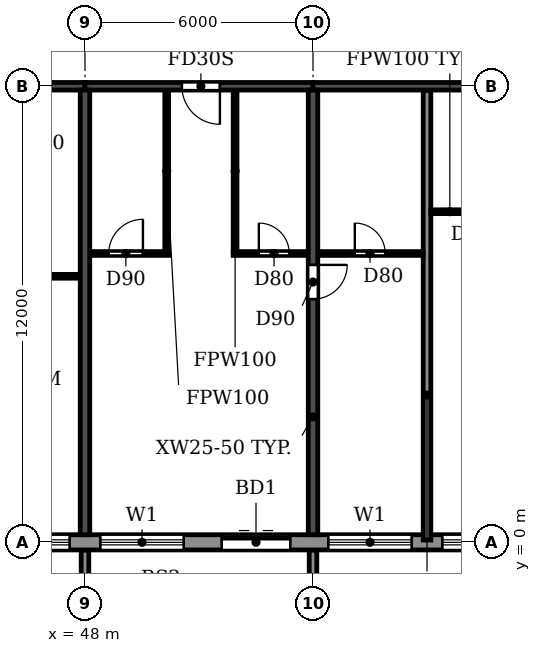
"""IFC4 building model, lengths in metres.
Left out: names, types, materials, properties, quantities, classifications, styles, units other than length and angle.
Written with IfcOpenShell. Run it as: python <this file> out.ifc"""

import sys

from ifc_helpers import new_model, si_unit, direction, frame, frame_2d, origin, place, context, subcontext, project, spatial, polyline, rectangle, outline, extrude, source, transform, mapped, element, fill, save


model = new_model("IFC4")
c1 = context("Model", 3, precision=1e-05, world=origin(), true_north=direction((0.0, 1.0)))
c2 = subcontext(c1, "Body", "Model", "MODEL_VIEW")
j1 = project(units=[si_unit("LENGTHUNIT", "METRE"), si_unit("PLANEANGLEUNIT", "RADIAN")], contexts=[c1])
p1 = place(None, origin())
s1 = spatial("IfcSite", under=j1, at=p1, CompositionType="ELEMENT")
p2 = place(p1, origin())
s2 = spatial("IfcBuilding", under=s1, at=p2, CompositionType="ELEMENT")
p3 = place(p2, frame((0.0, 0.0, 257.7)))
s3 = spatial("IfcBuildingStorey", under=s2, at=p3, CompositionType="ELEMENT", Elevation=257.7)
p4 = place(p3, frame((48.0, 0.2, 0.0), z_axis=(0.0, 0.0, 1.0), x_axis=(0.0, 1.0, 0.0)))
e1 = element("IfcWall", 1, at=p4, inside=s3, PredefinedType="SHEAR", context=c2, shape_type="SweptSolid", body=[
    extrude(rectangle(XDim=11.7, YDim=0.25, at=frame_2d((5.85, 0.0))), origin(), (0.0, 0.0, 1.0), 3.0),
])
p5 = place(p3, frame((54.0, 0.2, 0.0), z_axis=(0.0, 0.0, 1.0), x_axis=(0.0, 1.0, 0.0)))
e2 = element("IfcWall", 2, at=p5, inside=s3, PredefinedType="SHEAR", context=c2, shape_type="SweptSolid", body=[
    extrude(rectangle(XDim=11.7, YDim=0.25, at=frame_2d((5.85, 0.0))), origin(), (0.0, 0.0, 1.0), 3.0),
])
p6 = place(p5, frame((6.2, 0.0, 0.0)))
e3 = element("IfcOpeningElement", 3, at=p6, cuts=e2, PredefinedType="OPENING", context=c2, shape_type="SweptSolid", body=[
    extrude(rectangle(XDim=0.9, YDim=2.1, at=frame_2d((0.45, 1.05))), frame((0.0, 0.135, 0.0), z_axis=(0.0, -1.0, 0.0), x_axis=(1.0, 0.0, 0.0)), (0.0, 0.0, 1.0), 0.27),
])
p7 = place(p3, frame((42.0, 12.0, 0.0), z_axis=(0.0, 0.0, 1.0), x_axis=(1.0, 0.0, 0.0)))
e4 = element("IfcWall", 4, at=p7, inside=s3, PredefinedType="SHEAR", context=c2, shape_type="SweptSolid", body=[
    extrude(rectangle(XDim=6.0, YDim=0.2, at=frame_2d((3.0, 0.0))), origin(), (0.0, 0.0, 1.0), 2.4),
])
p8 = place(p7, frame((2.55, 0.0, 0.0)))
e5 = element("IfcOpeningElement", 5, at=p8, cuts=e4, PredefinedType="OPENING", context=c2, shape_type="SweptSolid", body=[
    extrude(rectangle(XDim=1.0, YDim=2.1, at=frame_2d((0.5, 1.05))), frame((0.0, 0.11, 0.0), z_axis=(0.0, -1.0, 0.0), x_axis=(1.0, 0.0, 0.0)), (0.0, 0.0, 1.0), 0.22),
])
p9 = place(p3, frame((48.0, 12.0, 0.0), z_axis=(0.0, 0.0, 1.0), x_axis=(1.0, 0.0, 0.0)))
e6 = element("IfcWall", 6, at=p9, inside=s3, PredefinedType="SHEAR", context=c2, shape_type="SweptSolid", body=[
    extrude(rectangle(XDim=6.0, YDim=0.2, at=frame_2d((3.0, 0.0))), origin(), (0.0, 0.0, 1.0), 2.4),
])
p10 = place(p9, frame((2.55, 0.0, 0.0)))
e7 = element("IfcOpeningElement", 7, at=p10, cuts=e6, PredefinedType="OPENING", context=c2, shape_type="SweptSolid", body=[
    extrude(rectangle(XDim=1.0, YDim=2.1, at=frame_2d((0.5, 1.05))), frame((0.0, 0.11, 0.0), z_axis=(0.0, -1.0, 0.0), x_axis=(1.0, 0.0, 0.0)), (0.0, 0.0, 1.0), 0.22),
])
p11 = place(p3, frame((54.0, 12.0, 0.0), z_axis=(0.0, 0.0, 1.0), x_axis=(1.0, 0.0, 0.0)))
e8 = element("IfcWall", 8, at=p11, inside=s3, PredefinedType="SHEAR", context=c2, shape_type="SweptSolid", body=[
    extrude(rectangle(XDim=6.0, YDim=0.2, at=frame_2d((3.0, 0.0))), origin(), (0.0, 0.0, 1.0), 2.4),
])
p12 = place(p3, frame((22.683, 0.0, 0.0), z_axis=(0.0, 0.0, 1.0), x_axis=(1.0, 0.0, 0.0)))
e9 = element("IfcWall", 9, at=p12, inside=s3, PredefinedType="STANDARD", context=c2, shape_type="SweptSolid", body=[
    extrude(rectangle(XDim=56.634, YDim=0.4, at=frame_2d((28.317, 0.0))), origin(), (0.0, 0.0, 1.0), 3.0),
])
p13 = place(p12, frame((1.717, 0.0, 0.9)))
e10 = element("IfcOpeningElement", 10, at=p13, cuts=e9, PredefinedType="OPENING", context=c2, shape_type="SweptSolid", body=[
    extrude(rectangle(XDim=2.2, YDim=1.5, at=frame_2d((1.1, 0.75))), frame((0.0, 0.21, 0.0), z_axis=(0.0, -1.0, 0.0), x_axis=(1.0, 0.0, 0.0)), (0.0, 0.0, 1.0), 0.42),
])
p14 = place(p12, frame((4.917, 0.0, 0.0)))
e11 = element("IfcOpeningElement", 11, at=p14, cuts=e9, PredefinedType="OPENING", context=c2, shape_type="SweptSolid", body=[
    extrude(rectangle(XDim=1.8, YDim=2.4, at=frame_2d((0.9, 1.2))), frame((0.0, 0.21, 0.0), z_axis=(0.0, -1.0, 0.0), x_axis=(1.0, 0.0, 0.0)), (0.0, 0.0, 1.0), 0.42),
])
p15 = place(p12, frame((7.717, 0.0, 0.9)))
e12 = element("IfcOpeningElement", 12, at=p15, cuts=e9, PredefinedType="OPENING", context=c2, shape_type="SweptSolid", body=[
    extrude(rectangle(XDim=2.2, YDim=1.5, at=frame_2d((1.1, 0.75))), frame((0.0, 0.21, 0.0), z_axis=(0.0, -1.0, 0.0), x_axis=(1.0, 0.0, 0.0)), (0.0, 0.0, 1.0), 0.42),
])
p16 = place(p12, frame((10.717, 0.0, 0.9)))
e13 = element("IfcOpeningElement", 13, at=p16, cuts=e9, PredefinedType="OPENING", context=c2, shape_type="SweptSolid", body=[
    extrude(rectangle(XDim=2.2, YDim=1.5, at=frame_2d((1.1, 0.75))), frame((0.0, 0.21, 0.0), z_axis=(0.0, -1.0, 0.0), x_axis=(1.0, 0.0, 0.0)), (0.0, 0.0, 1.0), 0.42),
])
p17 = place(p12, frame((13.717, 0.0, 0.9)))
e14 = element("IfcOpeningElement", 14, at=p17, cuts=e9, PredefinedType="OPENING", context=c2, shape_type="SweptSolid", body=[
    extrude(rectangle(XDim=2.2, YDim=1.5, at=frame_2d((1.1, 0.75))), frame((0.0, 0.21, 0.0), z_axis=(0.0, -1.0, 0.0), x_axis=(1.0, 0.0, 0.0)), (0.0, 0.0, 1.0), 0.42),
])
p18 = place(p12, frame((16.917, 0.0, 0.0)))
e15 = element("IfcOpeningElement", 15, at=p18, cuts=e9, PredefinedType="OPENING", context=c2, shape_type="SweptSolid", body=[
    extrude(rectangle(XDim=1.8, YDim=2.4, at=frame_2d((0.9, 1.2))), frame((0.0, 0.21, 0.0), z_axis=(0.0, -1.0, 0.0), x_axis=(1.0, 0.0, 0.0)), (0.0, 0.0, 1.0), 0.42),
])
p19 = place(p12, frame((19.717, 0.0, 0.9)))
e16 = element("IfcOpeningElement", 16, at=p19, cuts=e9, PredefinedType="OPENING", context=c2, shape_type="SweptSolid", body=[
    extrude(rectangle(XDim=2.2, YDim=1.5, at=frame_2d((1.1, 0.75))), frame((0.0, 0.21, 0.0), z_axis=(0.0, -1.0, 0.0), x_axis=(1.0, 0.0, 0.0)), (0.0, 0.0, 1.0), 0.42),
])
p20 = place(p12, frame((22.717, 0.0, 0.9)))
e17 = element("IfcOpeningElement", 17, at=p20, cuts=e9, PredefinedType="OPENING", context=c2, shape_type="SweptSolid", body=[
    extrude(rectangle(XDim=2.2, YDim=1.5, at=frame_2d((1.1, 0.75))), frame((0.0, 0.21, 0.0), z_axis=(0.0, -1.0, 0.0), x_axis=(1.0, 0.0, 0.0)), (0.0, 0.0, 1.0), 0.42),
])
p21 = place(p12, frame((25.717, 0.0, 0.9)))
e18 = element("IfcOpeningElement", 18, at=p21, cuts=e9, PredefinedType="OPENING", context=c2, shape_type="SweptSolid", body=[
    extrude(rectangle(XDim=2.2, YDim=1.5, at=frame_2d((1.1, 0.75))), frame((0.0, 0.21, 0.0), z_axis=(0.0, -1.0, 0.0), x_axis=(1.0, 0.0, 0.0)), (0.0, 0.0, 1.0), 0.42),
])
p22 = place(p12, frame((28.917, 0.0, 0.0)))
e19 = element("IfcOpeningElement", 19, at=p22, cuts=e9, PredefinedType="OPENING", context=c2, shape_type="SweptSolid", body=[
    extrude(rectangle(XDim=1.8, YDim=2.4, at=frame_2d((0.9, 1.2))), frame((0.0, 0.21, 0.0), z_axis=(0.0, -1.0, 0.0), x_axis=(1.0, 0.0, 0.0)), (0.0, 0.0, 1.0), 0.42),
])
p23 = place(p12, frame((31.717, 0.0, 0.9)))
e20 = element("IfcOpeningElement", 20, at=p23, cuts=e9, PredefinedType="OPENING", context=c2, shape_type="SweptSolid", body=[
    extrude(rectangle(XDim=2.2, YDim=1.5, at=frame_2d((1.1, 0.75))), frame((0.0, 0.21, 0.0), z_axis=(0.0, -1.0, 0.0), x_axis=(1.0, 0.0, 0.0)), (0.0, 0.0, 1.0), 0.42),
])
p24 = place(p12, frame((34.717, 0.0, 0.9)))
e21 = element("IfcOpeningElement", 21, at=p24, cuts=e9, PredefinedType="OPENING", context=c2, shape_type="SweptSolid", body=[
    extrude(rectangle(XDim=2.2, YDim=1.5, at=frame_2d((1.1, 0.75))), frame((0.0, 0.21, 0.0), z_axis=(0.0, -1.0, 0.0), x_axis=(1.0, 0.0, 0.0)), (0.0, 0.0, 1.0), 0.42),
])
p25 = place(p12, frame((37.717, 0.0, 0.9)))
e22 = element("IfcOpeningElement", 22, at=p25, cuts=e9, PredefinedType="OPENING", context=c2, shape_type="SweptSolid", body=[
    extrude(rectangle(XDim=2.2, YDim=1.5, at=frame_2d((1.1, 0.75))), frame((0.0, 0.21, 0.0), z_axis=(0.0, -1.0, 0.0), x_axis=(1.0, 0.0, 0.0)), (0.0, 0.0, 1.0), 0.42),
])
p26 = place(p12, frame((40.917, 0.0, 0.0)))
e23 = element("IfcOpeningElement", 23, at=p26, cuts=e9, PredefinedType="OPENING", context=c2, shape_type="SweptSolid", body=[
    extrude(rectangle(XDim=1.8, YDim=2.4, at=frame_2d((0.9, 1.2))), frame((0.0, 0.21, 0.0), z_axis=(0.0, -1.0, 0.0), x_axis=(1.0, 0.0, 0.0)), (0.0, 0.0, 1.0), 0.42),
])
p27 = place(p12, frame((43.717, 0.0, 0.9)))
e24 = element("IfcOpeningElement", 24, at=p27, cuts=e9, PredefinedType="OPENING", context=c2, shape_type="SweptSolid", body=[
    extrude(rectangle(XDim=2.2, YDim=1.5, at=frame_2d((1.1, 0.75))), frame((0.0, 0.21, 0.0), z_axis=(0.0, -1.0, 0.0), x_axis=(1.0, 0.0, 0.0)), (0.0, 0.0, 1.0), 0.42),
])
p28 = place(p12, frame((46.717, 0.0, 0.9)))
e25 = element("IfcOpeningElement", 25, at=p28, cuts=e9, PredefinedType="OPENING", context=c2, shape_type="SweptSolid", body=[
    extrude(rectangle(XDim=2.2, YDim=1.5, at=frame_2d((1.1, 0.75))), frame((0.0, 0.21, 0.0), z_axis=(0.0, -1.0, 0.0), x_axis=(1.0, 0.0, 0.0)), (0.0, 0.0, 1.0), 0.42),
])
p29 = place(p12, frame((49.717, 0.0, 0.9)))
e26 = element("IfcOpeningElement", 26, at=p29, cuts=e9, PredefinedType="OPENING", context=c2, shape_type="SweptSolid", body=[
    extrude(rectangle(XDim=2.2, YDim=1.5, at=frame_2d((1.1, 0.75))), frame((0.0, 0.21, 0.0), z_axis=(0.0, -1.0, 0.0), x_axis=(1.0, 0.0, 0.0)), (0.0, 0.0, 1.0), 0.42),
])
p30 = place(p12, frame((52.917, 0.0, 0.0)))
e27 = element("IfcOpeningElement", 27, at=p30, cuts=e9, PredefinedType="OPENING", context=c2, shape_type="SweptSolid", body=[
    extrude(rectangle(XDim=1.8, YDim=2.4, at=frame_2d((0.9, 1.2))), frame((0.0, 0.21, 0.0), z_axis=(0.0, -1.0, 0.0), x_axis=(1.0, 0.0, 0.0)), (0.0, 0.0, 1.0), 0.42),
])
m1 = source(origin(), c2, "Body", "SweptSolid", [
    extrude(outline(polyline([(0.0, 0.0), (0.2, 0.0), (0.2, 1.65), (0.0, 1.65), (0.0, 0.0)])), origin(), (0.0, 0.0, 1.0), 3.1),
])
for number, where in (
    (28, (47.9, -1.85, 0.0)),
    (29, (53.9, -1.85, 0.0)),
):
    element("IfcWall", number, at=place(p3, frame(where)), inside=s3, PredefinedType="STANDARD", context=c2, shape_type="MappedRepresentation", body=[
        mapped(m1, transform((0.0, 0.0, 0.0))),
    ])
p31 = place(p3, frame((57.0, 0.06, 0.0), z_axis=(0.0, 0.0, 1.0), x_axis=(0.0, 1.0, 0.0)))
e30 = element("IfcWall", 30, at=p31, inside=s3, PredefinedType="PARTITIONING", context=c2, shape_type="SweptSolid", body=[
    extrude(rectangle(XDim=11.83, YDim=0.2, at=frame_2d((5.915, 0.0))), origin(), (0.0, 0.0, 1.0), 3.0),
])
p32 = place(p3, frame((45.9, 7.0, 0.0), z_axis=(0.0, 0.0, 1.0), x_axis=(1.0, 0.0, 0.0)))
e31 = element("IfcWall", 31, at=p32, inside=s3, PredefinedType="PARTITIONING", context=c2, shape_type="SweptSolid", body=[
    extrude(rectangle(XDim=1.965, YDim=0.1, at=frame_2d((0.982, 0.0))), origin(), (0.0, 0.0, 1.0), 3.0),
])
p33 = place(p3, frame((48.135, 7.6, 0.0), z_axis=(0.0, 0.0, 1.0), x_axis=(1.0, 0.0, 0.0)))
e32 = element("IfcWall", 32, at=p33, inside=s3, PredefinedType="PARTITIONING", context=c2, shape_type="SweptSolid", body=[
    extrude(rectangle(XDim=2.065, YDim=0.1, at=frame_2d((1.032, 0.0))), origin(), (0.0, 0.0, 1.0), 3.0),
])
p34 = place(p33, frame((0.49, 0.0, 0.0)))
e33 = element("IfcOpeningElement", 33, at=p34, cuts=e32, PredefinedType="OPENING", context=c2, shape_type="SweptSolid", body=[
    extrude(rectangle(XDim=0.9, YDim=2.1, at=frame_2d((0.45, 1.05))), frame((0.0, 0.06, 0.0), z_axis=(0.0, -1.0, 0.0), x_axis=(1.0, 0.0, 0.0)), (0.0, 0.0, 1.0), 0.12),
])
p35 = place(p3, frame((51.9, 7.6, 0.0), z_axis=(0.0, 0.0, 1.0), x_axis=(1.0, 0.0, 0.0)))
e34 = element("IfcWall", 34, at=p35, inside=s3, PredefinedType="PARTITIONING", context=c2, shape_type="SweptSolid", body=[
    extrude(rectangle(XDim=1.965, YDim=0.1, at=frame_2d((0.982, 0.0))), origin(), (0.0, 0.0, 1.0), 3.0),
])
p36 = place(p35, frame((0.675, 0.0, 0.0)))
e35 = element("IfcOpeningElement", 35, at=p36, cuts=e34, PredefinedType="OPENING", context=c2, shape_type="SweptSolid", body=[
    extrude(rectangle(XDim=0.8, YDim=2.1, at=frame_2d((0.4, 1.05))), frame((0.0, 0.06, 0.0), z_axis=(0.0, -1.0, 0.0), x_axis=(1.0, 0.0, 0.0)), (0.0, 0.0, 1.0), 0.12),
])
p37 = place(p3, frame((54.135, 7.6, 0.0), z_axis=(0.0, 0.0, 1.0), x_axis=(1.0, 0.0, 0.0)))
e36 = element("IfcWall", 36, at=p37, inside=s3, PredefinedType="PARTITIONING", context=c2, shape_type="SweptSolid", body=[
    extrude(rectangle(XDim=2.765, YDim=0.1, at=frame_2d((1.382, 0.0))), origin(), (0.0, 0.0, 1.0), 3.0),
])
p38 = place(p37, frame((0.965, 0.0, 0.0)))
e37 = element("IfcOpeningElement", 37, at=p38, cuts=e36, PredefinedType="OPENING", context=c2, shape_type="SweptSolid", body=[
    extrude(rectangle(XDim=0.8, YDim=2.1, at=frame_2d((0.4, 1.05))), frame((0.0, 0.06, 0.0), z_axis=(0.0, -1.0, 0.0), x_axis=(1.0, 0.0, 0.0)), (0.0, 0.0, 1.0), 0.12),
])
p39 = place(p3, frame((57.1, 8.7, 0.0), z_axis=(0.0, 0.0, 1.0), x_axis=(1.0, 0.0, 0.0)))
e38 = element("IfcWall", 38, at=p39, inside=s3, PredefinedType="PARTITIONING", context=c2, shape_type="SweptSolid", body=[
    extrude(rectangle(XDim=2.765, YDim=0.1, at=frame_2d((1.382, 0.0))), origin(), (0.0, 0.0, 1.0), 3.0),
])
p40 = place(p39, frame((1.0, 0.0, 0.0)))
e39 = element("IfcOpeningElement", 39, at=p40, cuts=e38, PredefinedType="OPENING", context=c2, shape_type="SweptSolid", body=[
    extrude(rectangle(XDim=0.8, YDim=2.1, at=frame_2d((0.4, 1.05))), frame((0.0, 0.06, 0.0), z_axis=(0.0, -1.0, 0.0), x_axis=(1.0, 0.0, 0.0)), (0.0, 0.0, 1.0), 0.12),
])
for number, where, z_axis, x_axis in (
    (40, (50.15, 7.65, 0.0), (0.0, 0.0, 1.0), (0.0, 1.0, 0.0)),
    (41, (51.95, 7.65, 0.0), (0.0, 0.0, 1.0), (0.0, 1.0, 0.0)),
):
    element("IfcWall", number, at=place(p3, frame(where, z_axis=z_axis, x_axis=x_axis)), inside=s3, PredefinedType="PARTITIONING", context=c2, shape_type="SweptSolid", body=[
        extrude(rectangle(XDim=4.24, YDim=0.1, at=frame_2d((2.12, 0.0))), origin(), (0.0, 0.0, 1.0), 3.0),
    ])
p41 = place(p20, origin())
e42 = element("IfcWindow", 42, at=p41, inside=s3, PartitioningType="DOUBLE_PANEL_HORIZONTAL", PredefinedType="WINDOW", context=c2, shape_type="SweptSolid", body=[
    extrude(rectangle(XDim=2.2, YDim=1.5, at=frame_2d((1.1, 0.75))), frame((0.0, 0.03, 0.0), z_axis=(0.0, -1.0, 0.0), x_axis=(1.0, 0.0, 0.0)), (0.0, 0.0, 1.0), 0.06),
])
fill(e17, e42)
p42 = place(p21, origin())
e43 = element("IfcWindow", 43, at=p42, inside=s3, PartitioningType="DOUBLE_PANEL_HORIZONTAL", PredefinedType="WINDOW", context=c2, shape_type="SweptSolid", body=[
    extrude(rectangle(XDim=2.2, YDim=1.5, at=frame_2d((1.1, 0.75))), frame((0.0, 0.03, 0.0), z_axis=(0.0, -1.0, 0.0), x_axis=(1.0, 0.0, 0.0)), (0.0, 0.0, 1.0), 0.06),
])
fill(e18, e43)
p43 = place(p22, origin())
e44 = element("IfcDoor", 44, at=p43, inside=s3, OperationType="DOUBLE_DOOR_SLIDING", PredefinedType="DOOR", context=c2, shape_type="SweptSolid", body=[
    extrude(rectangle(XDim=1.8, YDim=2.4, at=frame_2d((0.9, 1.2))), frame((0.0, 0.025, 0.0), z_axis=(0.0, -1.0, 0.0), x_axis=(1.0, 0.0, 0.0)), (0.0, 0.0, 1.0), 0.05),
])
fill(e19, e44)
p44 = place(p23, origin())
e45 = element("IfcWindow", 45, at=p44, inside=s3, PartitioningType="DOUBLE_PANEL_HORIZONTAL", PredefinedType="WINDOW", context=c2, shape_type="SweptSolid", body=[
    extrude(rectangle(XDim=2.2, YDim=1.5, at=frame_2d((1.1, 0.75))), frame((0.0, 0.03, 0.0), z_axis=(0.0, -1.0, 0.0), x_axis=(1.0, 0.0, 0.0)), (0.0, 0.0, 1.0), 0.06),
])
fill(e20, e45)
p45 = place(p24, origin())
e46 = element("IfcWindow", 46, at=p45, inside=s3, PartitioningType="DOUBLE_PANEL_HORIZONTAL", PredefinedType="WINDOW", context=c2, shape_type="SweptSolid", body=[
    extrude(rectangle(XDim=2.2, YDim=1.5, at=frame_2d((1.1, 0.75))), frame((0.0, 0.03, 0.0), z_axis=(0.0, -1.0, 0.0), x_axis=(1.0, 0.0, 0.0)), (0.0, 0.0, 1.0), 0.06),
])
fill(e21, e46)
p46 = place(p38, origin())
e47 = element("IfcDoor", 47, at=p46, inside=s3, OperationType="SINGLE_SWING_LEFT", PredefinedType="DOOR", context=c2, shape_type="SweptSolid", body=[
    extrude(rectangle(XDim=0.8, YDim=2.1, at=frame_2d((0.4, 1.05))), frame((0.0, 0.025, 0.0), z_axis=(0.0, -1.0, 0.0), x_axis=(1.0, 0.0, 0.0)), (0.0, 0.0, 1.0), 0.05),
])
fill(e37, e47)
p47 = place(p34, origin())
e48 = element("IfcDoor", 48, at=p47, inside=s3, OperationType="SINGLE_SWING_RIGHT", PredefinedType="DOOR", context=c2, shape_type="SweptSolid", body=[
    extrude(rectangle(XDim=0.9, YDim=2.1, at=frame_2d((0.45, 1.05))), frame((0.0, 0.025, 0.0), z_axis=(0.0, -1.0, 0.0), x_axis=(1.0, 0.0, 0.0)), (0.0, 0.0, 1.0), 0.05),
])
fill(e33, e48)
p48 = place(p10, frame((1.0, 0.0, 0.0), z_axis=(0.0, 0.0, 1.0), x_axis=(-1.0, 0.0, 0.0)))
e49 = element("IfcDoor", 49, at=p48, inside=s3, OperationType="SINGLE_SWING_LEFT", PredefinedType="DOOR", context=c2, shape_type="SweptSolid", body=[
    extrude(rectangle(XDim=1.0, YDim=2.1, at=frame_2d((0.5, 1.05))), frame((0.0, 0.025, 0.0), z_axis=(0.0, -1.0, 0.0), x_axis=(1.0, 0.0, 0.0)), (0.0, 0.0, 1.0), 0.05),
])
fill(e7, e49)
p49 = place(p36, origin())
e50 = element("IfcDoor", 50, at=p49, inside=s3, OperationType="SINGLE_SWING_LEFT", PredefinedType="DOOR", context=c2, shape_type="SweptSolid", body=[
    extrude(rectangle(XDim=0.8, YDim=2.1, at=frame_2d((0.4, 1.05))), frame((0.0, 0.025, 0.0), z_axis=(0.0, -1.0, 0.0), x_axis=(1.0, 0.0, 0.0)), (0.0, 0.0, 1.0), 0.05),
])
fill(e35, e50)
p50 = place(p6, frame((0.9, 0.0, 0.0), z_axis=(0.0, 0.0, 1.0), x_axis=(-1.0, 0.0, 0.0)))
e51 = element("IfcDoor", 51, at=p50, inside=s3, OperationType="SINGLE_SWING_LEFT", PredefinedType="DOOR", context=c2, shape_type="SweptSolid", body=[
    extrude(rectangle(XDim=0.9, YDim=2.1, at=frame_2d((0.45, 1.05))), frame((0.0, 0.025, 0.0), z_axis=(0.0, -1.0, 0.0), x_axis=(1.0, 0.0, 0.0)), (0.0, 0.0, 1.0), 0.05),
])
fill(e3, e51)
save(model, sys.argv[1])
